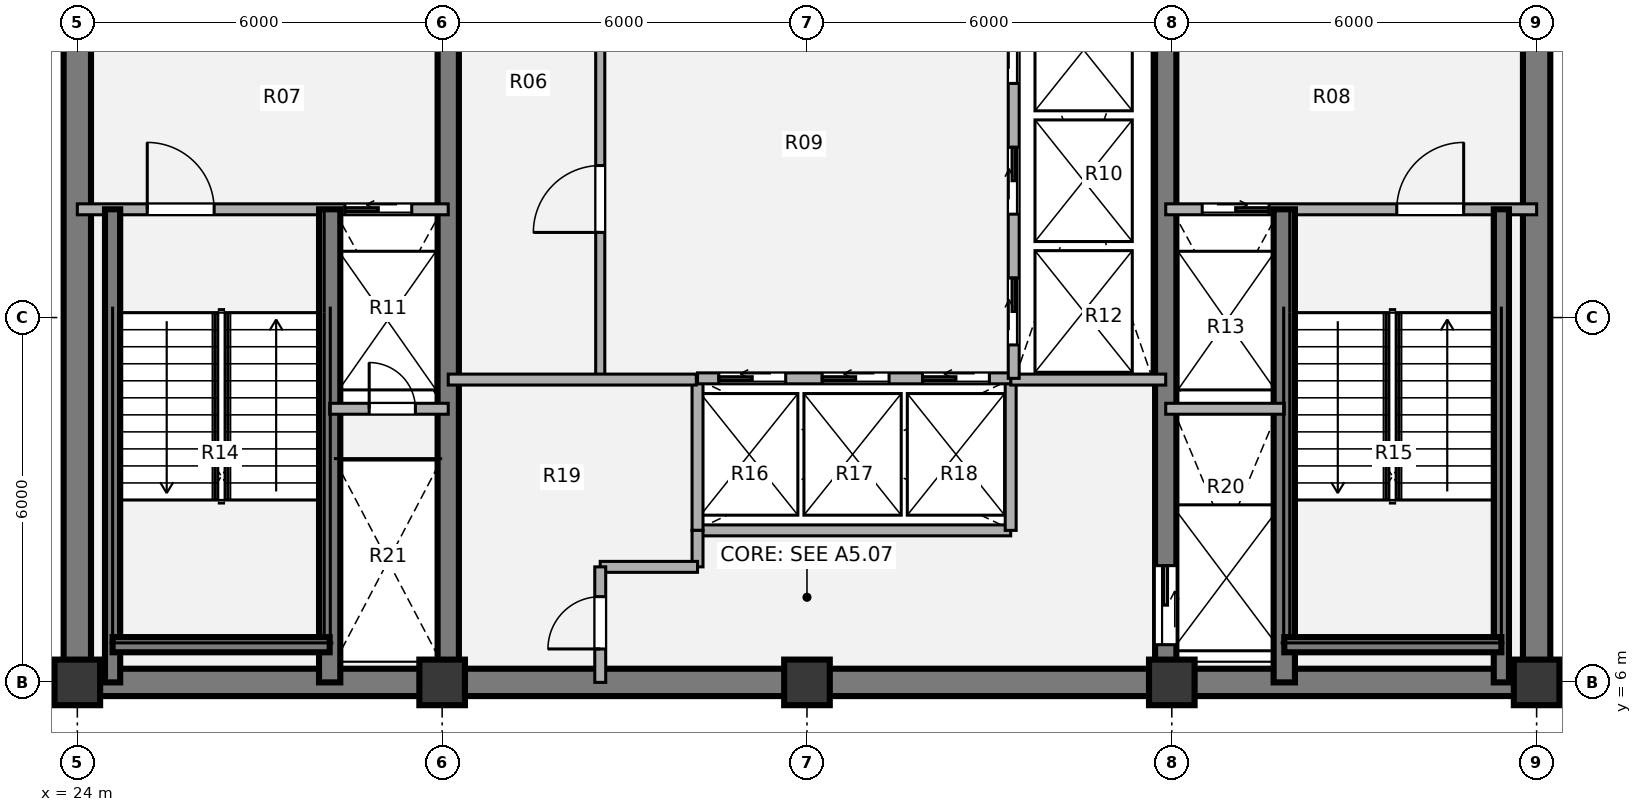
"""IFC4 building model, lengths in metres.
Left out: names, types, materials, properties, quantities, classifications, styles, units other than length and angle.
Written with IfcOpenShell. Run it as: python <this file> out.ifc"""

import sys

from ifc_helpers import new_model, si_unit, direction, frame, frame_2d, origin, origin_2d, place, context, subcontext, project, spatial, rectangle, extrude, source, transform, mapped, element, fill, save


model = new_model("IFC4")
c1 = context("Model", 3, precision=1e-05, world=origin(), true_north=direction((0.0, 1.0)))
c2 = subcontext(c1, "Body", "Model", "MODEL_VIEW")
j1 = project(units=[si_unit("LENGTHUNIT", "METRE"), si_unit("PLANEANGLEUNIT", "RADIAN")], contexts=[c1])
p1 = place(None, origin())
s1 = spatial("IfcSite", under=j1, at=p1, CompositionType="ELEMENT")
p2 = place(p1, origin())
s2 = spatial("IfcBuilding", under=s1, at=p2, CompositionType="ELEMENT")
p3 = place(p2, frame((0.0, 0.0, 151.92)))
s3 = spatial("IfcBuildingStorey", under=s2, at=p3, CompositionType="ELEMENT", Elevation=151.92)
m1 = source(origin(), c2, "Body", "SweptSolid", [
    extrude(rectangle(XDim=0.75, YDim=0.75, at=origin_2d()), origin(), (0.0, 0.0, 1.0), 4.5),
])
for number, where, z_axis, x_axis in (
    (1, (24.0, 6.0, 0.0), (0.0, 0.0, 1.0), (1.0, 0.0, 0.0)),
    (2, (30.0, 6.0, 0.0), (0.0, 0.0, 1.0), (1.0, 0.0, 0.0)),
    (3, (36.0, 6.0, 0.0), (0.0, 0.0, 1.0), (1.0, 0.0, 0.0)),
    (4, (42.0, 6.0, 0.0), (0.0, 0.0, 1.0), (1.0, 0.0, 0.0)),
    (5, (48.0, 6.0, 0.0), (0.0, 0.0, 1.0), (1.0, 0.0, 0.0)),
):
    element("IfcColumn", number, at=place(p3, frame(where, z_axis=z_axis, x_axis=x_axis)), inside=s3, PredefinedType="COLUMN", context=c2, shape_type="MappedRepresentation", body=[
        mapped(m1, transform((0.0, 0.0, 0.0), x_axis=(1.0, 0.0, 0.0), y_axis=(0.0, 1.0, 0.0), z_axis=(0.0, 0.0, 1.0), scale=1.0)),
    ])
p4 = place(p3, frame((48.225, 6.0, 0.0), z_axis=(0.0, 0.0, 1.0), x_axis=(-1.0, 0.0, 0.0)))
e6 = element("IfcWall", 6, at=p4, inside=s3, PredefinedType="SHEAR", context=c2, shape_type="SweptSolid", body=[
    extrude(rectangle(XDim=24.45, YDim=0.45, at=frame_2d((12.225, 0.0))), origin(), (0.0, 0.0, 1.0), 4.5),
])
for number, where, z_axis, x_axis in (
    (7, (24.0, 6.0, 0.0), (0.0, 0.0, 1.0), (0.0, 1.0, 0.0)),
    (8, (48.0, 18.0, 0.0), (0.0, 0.0, 1.0), (0.0, -1.0, 0.0)),
):
    element("IfcWall", number, at=place(p3, frame(where, z_axis=z_axis, x_axis=x_axis)), inside=s3, PredefinedType="SHEAR", context=c2, shape_type="SweptSolid", body=[
        extrude(rectangle(XDim=12.0, YDim=0.45, at=frame_2d((6.0, 0.0))), origin(), (0.0, 0.0, 1.0), 4.5),
    ])
p5 = place(p3, frame((30.1, 6.0, 0.0), z_axis=(0.0, 0.0, 1.0), x_axis=(0.0, 1.0, 0.0)))
e9 = element("IfcWall", 9, at=p5, inside=s3, PredefinedType="SHEAR", context=c2, shape_type="SweptSolid", body=[
    extrude(rectangle(XDim=12.0, YDim=0.35, at=frame_2d((6.0, 0.0))), origin(), (0.0, 0.0, 1.0), 4.5),
])
p6 = place(p3, frame((41.9, 18.0, 0.0), z_axis=(0.0, 0.0, 1.0), x_axis=(0.0, -1.0, 0.0)))
e10 = element("IfcWall", 10, at=p6, inside=s3, PredefinedType="SHEAR", context=c2, shape_type="SweptSolid", body=[
    extrude(rectangle(XDim=12.0, YDim=0.35, at=frame_2d((6.0, 0.0))), origin(), (0.0, 0.0, 1.0), 4.5),
])
p7 = place(p6, frame((10.08, 0.0, 0.0)))
e11 = element("IfcOpeningElement", 11, at=p7, cuts=e10, PredefinedType="OPENING", context=c2, shape_type="SweptSolid", body=[
    extrude(rectangle(XDim=1.3, YDim=2.1, at=origin_2d()), frame((0.65, 0.185, 1.05), z_axis=(0.0, -1.0, 0.0), x_axis=(1.0, 0.0, 0.0)), (0.0, 0.0, 1.0), 0.37),
])
p8 = place(p3, frame((32.6, 11.0, 0.0), z_axis=(0.0, 0.0, 1.0), x_axis=(0.0, 1.0, 0.0)))
e12 = element("IfcWall", 12, at=p8, inside=s3, PredefinedType="PARTITIONING", context=c2, shape_type="SweptSolid", body=[
    extrude(rectangle(XDim=7.0, YDim=0.15, at=frame_2d((3.5, 0.0))), origin(), (0.0, 0.0, 1.0), 4.062),
])
p9 = place(p8, frame((2.4, 0.0, 0.0)))
e13 = element("IfcOpeningElement", 13, at=p9, cuts=e12, PredefinedType="OPENING", context=c2, shape_type="SweptSolid", body=[
    extrude(rectangle(XDim=1.1, YDim=2.1, at=origin_2d()), frame((0.55, 0.085, 1.05), z_axis=(0.0, -1.0, 0.0), x_axis=(1.0, 0.0, 0.0)), (0.0, 0.0, 1.0), 0.17),
])
p10 = place(p3, frame((34.2, 8.5, 0.0), z_axis=(0.0, 0.0, 1.0), x_axis=(1.0, 0.0, 0.0)))
e14 = element("IfcWall", 14, at=p10, inside=s3, PredefinedType="PARTITIONING", context=c2, shape_type="SweptSolid", body=[
    extrude(rectangle(XDim=5.15, YDim=0.18, at=frame_2d((2.575, 0.0))), origin(), (0.0, 0.0, 1.0), 4.062),
])
for number, where, z_axis, x_axis in (
    (15, (34.2, 8.5, 0.0), (0.0, 0.0, 1.0), (0.0, 1.0, 0.0)),
    (16, (39.35, 8.5, 0.0), (0.0, 0.0, 1.0), (0.0, 1.0, 0.0)),
):
    element("IfcWall", number, at=place(p3, frame(where, z_axis=z_axis, x_axis=x_axis)), inside=s3, PredefinedType="PARTITIONING", context=c2, shape_type="SweptSolid", body=[
        extrude(rectangle(XDim=2.5, YDim=0.18, at=frame_2d((1.25, 0.0))), origin(), (0.0, 0.0, 1.0), 4.062),
    ])
p11 = place(p3, frame((30.1, 10.98, 0.0), z_axis=(0.0, 0.0, 1.0), x_axis=(1.0, 0.0, 0.0)))
e17 = element("IfcWall", 17, at=p11, inside=s3, PredefinedType="PARTITIONING", context=c2, shape_type="SweptSolid", body=[
    extrude(rectangle(XDim=4.08, YDim=0.18, at=frame_2d((2.04, 0.0))), origin(), (0.0, 0.0, 1.0), 4.062),
])
p12 = place(p3, frame((34.2, 7.9, 0.0), z_axis=(0.0, 0.0, 1.0), x_axis=(0.0, 1.0, 0.0)))
e18 = element("IfcWall", 18, at=p12, inside=s3, PredefinedType="PARTITIONING", context=c2, shape_type="SweptSolid", body=[
    extrude(rectangle(XDim=0.6, YDim=0.18, at=frame_2d((0.3, 0.0))), origin(), (0.0, 0.0, 1.0), 4.062),
])
p13 = place(p3, frame((32.6, 7.9, 0.0), z_axis=(0.0, 0.0, 1.0), x_axis=(1.0, 0.0, 0.0)))
e19 = element("IfcWall", 19, at=p13, inside=s3, PredefinedType="PARTITIONING", context=c2, shape_type="SweptSolid", body=[
    extrude(rectangle(XDim=1.6, YDim=0.18, at=frame_2d((0.8, 0.0))), origin(), (0.0, 0.0, 1.0), 4.062),
])
p14 = place(p3, frame((32.6, 6.0, 0.0), z_axis=(0.0, 0.0, 1.0), x_axis=(0.0, 1.0, 0.0)))
e20 = element("IfcWall", 20, at=p14, inside=s3, PredefinedType="PARTITIONING", context=c2, shape_type="SweptSolid", body=[
    extrude(rectangle(XDim=1.9, YDim=0.18, at=frame_2d((0.95, 0.0))), origin(), (0.0, 0.0, 1.0), 4.062),
])
p15 = place(p14, frame((0.55, 0.0, 0.0)))
e21 = element("IfcOpeningElement", 21, at=p15, cuts=e20, PredefinedType="OPENING", context=c2, shape_type="SweptSolid", body=[
    extrude(rectangle(XDim=0.86, YDim=2.1, at=origin_2d()), frame((0.43, 0.1, 1.05), z_axis=(0.0, -1.0, 0.0), x_axis=(1.0, 0.0, 0.0)), (0.0, 0.0, 1.0), 0.2),
])
p16 = place(p3, frame((39.35, 10.98, 0.0), z_axis=(0.0, 0.0, 1.0), x_axis=(1.0, 0.0, 0.0)))
e22 = element("IfcWall", 22, at=p16, inside=s3, PredefinedType="PARTITIONING", context=c2, shape_type="SweptSolid", body=[
    extrude(rectangle(XDim=2.55, YDim=0.18, at=frame_2d((1.275, 0.0))), origin(), (0.0, 0.0, 1.0), 4.062),
])
p17 = place(p3, frame((24.0, 13.78, 0.0), z_axis=(0.0, 0.0, 1.0), x_axis=(1.0, 0.0, 0.0)))
e23 = element("IfcWall", 23, at=p17, inside=s3, PredefinedType="PARTITIONING", context=c2, shape_type="SweptSolid", body=[
    extrude(rectangle(XDim=6.1, YDim=0.18, at=frame_2d((3.05, 0.0))), origin(), (0.0, 0.0, 1.0), 4.062),
])
p18 = place(p17, frame((1.15, 0.0, 0.0)))
e24 = element("IfcOpeningElement", 24, at=p18, cuts=e23, PredefinedType="OPENING", context=c2, shape_type="SweptSolid", body=[
    extrude(rectangle(XDim=1.1, YDim=2.1, at=origin_2d()), frame((0.55, 0.1, 1.05), z_axis=(0.0, -1.0, 0.0), x_axis=(1.0, 0.0, 0.0)), (0.0, 0.0, 1.0), 0.2),
])
p19 = place(p17, frame((4.4, 0.0, 0.0)))
e25 = element("IfcOpeningElement", 25, at=p19, cuts=e23, PredefinedType="OPENING", context=c2, shape_type="SweptSolid", body=[
    extrude(rectangle(XDim=1.1, YDim=2.1, at=origin_2d()), frame((0.55, 0.1, 1.05), z_axis=(0.0, -1.0, 0.0), x_axis=(1.0, 0.0, 0.0)), (0.0, 0.0, 1.0), 0.2),
])
p20 = place(p3, frame((28.15, 6.0, 0.0), z_axis=(0.0, 0.0, 1.0), x_axis=(0.0, 1.0, 0.0)))
e26 = element("IfcWall", 26, at=p20, inside=s3, PredefinedType="SHEAR", context=c2, shape_type="SweptSolid", body=[
    extrude(rectangle(XDim=7.78, YDim=0.35, at=frame_2d((3.89, 0.0))), origin(), (0.0, 0.0, 1.0), 4.412),
])
p21 = place(p3, frame((24.58, 6.0, 0.0), z_axis=(0.0, 0.0, 1.0), x_axis=(0.0, 1.0, 0.0)))
e27 = element("IfcWall", 27, at=p21, inside=s3, PredefinedType="SHEAR", context=c2, shape_type="SweptSolid", body=[
    extrude(rectangle(XDim=7.78, YDim=0.25, at=frame_2d((3.89, 0.0))), origin(), (0.0, 0.0, 1.0), 4.412),
])
p22 = place(p3, frame((24.58, 6.62, 0.0), z_axis=(0.0, 0.0, 1.0), x_axis=(1.0, 0.0, 0.0)))
e28 = element("IfcWall", 28, at=p22, inside=s3, PredefinedType="SHEAR", context=c2, shape_type="SweptSolid", body=[
    extrude(rectangle(XDim=3.57, YDim=0.25, at=frame_2d((1.785, 0.0))), origin(), (0.0, 0.0, 1.0), 4.412),
])
p23 = place(p3, frame((28.15, 10.5, 0.0), z_axis=(0.0, 0.0, 1.0), x_axis=(1.0, 0.0, 0.0)))
e29 = element("IfcWall", 29, at=p23, inside=s3, PredefinedType="PARTITIONING", context=c2, shape_type="SweptSolid", body=[
    extrude(rectangle(XDim=1.95, YDim=0.18, at=frame_2d((0.975, 0.0))), origin(), (0.0, 0.0, 1.0), 4.062),
])
p24 = place(p23, frame((0.65, 0.0, 0.0)))
e30 = element("IfcOpeningElement", 30, at=p24, cuts=e29, PredefinedType="OPENING", context=c2, shape_type="SweptSolid", body=[
    extrude(rectangle(XDim=0.76, YDim=2.05, at=origin_2d()), frame((0.38, 0.1, 1.025), z_axis=(0.0, -1.0, 0.0), x_axis=(1.0, 0.0, 0.0)), (0.0, 0.0, 1.0), 0.2),
])
p25 = place(p3, frame((41.9, 13.78, 0.0), z_axis=(0.0, 0.0, 1.0), x_axis=(1.0, 0.0, 0.0)))
e31 = element("IfcWall", 31, at=p25, inside=s3, PredefinedType="PARTITIONING", context=c2, shape_type="SweptSolid", body=[
    extrude(rectangle(XDim=6.1, YDim=0.18, at=frame_2d((3.05, 0.0))), origin(), (0.0, 0.0, 1.0), 4.062),
])
p26 = place(p25, frame((0.6, 0.0, 0.0)))
e32 = element("IfcOpeningElement", 32, at=p26, cuts=e31, PredefinedType="OPENING", context=c2, shape_type="SweptSolid", body=[
    extrude(rectangle(XDim=1.1, YDim=2.1, at=origin_2d()), frame((0.55, 0.1, 1.05), z_axis=(0.0, -1.0, 0.0), x_axis=(1.0, 0.0, 0.0)), (0.0, 0.0, 1.0), 0.2),
])
p27 = place(p25, frame((3.8, 0.0, 0.0)))
e33 = element("IfcOpeningElement", 33, at=p27, cuts=e31, PredefinedType="OPENING", context=c2, shape_type="SweptSolid", body=[
    extrude(rectangle(XDim=1.1, YDim=2.1, at=origin_2d()), frame((0.55, 0.1, 1.05), z_axis=(0.0, -1.0, 0.0), x_axis=(1.0, 0.0, 0.0)), (0.0, 0.0, 1.0), 0.2),
])
p28 = place(p3, frame((43.85, 6.0, 0.0), z_axis=(0.0, 0.0, 1.0), x_axis=(0.0, 1.0, 0.0)))
e34 = element("IfcWall", 34, at=p28, inside=s3, PredefinedType="SHEAR", context=c2, shape_type="SweptSolid", body=[
    extrude(rectangle(XDim=7.78, YDim=0.35, at=frame_2d((3.89, 0.0))), origin(), (0.0, 0.0, 1.0), 4.412),
])
p29 = place(p3, frame((47.42, 6.0, 0.0), z_axis=(0.0, 0.0, 1.0), x_axis=(0.0, 1.0, 0.0)))
e35 = element("IfcWall", 35, at=p29, inside=s3, PredefinedType="SHEAR", context=c2, shape_type="SweptSolid", body=[
    extrude(rectangle(XDim=7.78, YDim=0.25, at=frame_2d((3.89, 0.0))), origin(), (0.0, 0.0, 1.0), 4.412),
])
p30 = place(p3, frame((43.85, 6.62, 0.0), z_axis=(0.0, 0.0, 1.0), x_axis=(1.0, 0.0, 0.0)))
e36 = element("IfcWall", 36, at=p30, inside=s3, PredefinedType="SHEAR", context=c2, shape_type="SweptSolid", body=[
    extrude(rectangle(XDim=3.57, YDim=0.25, at=frame_2d((1.785, 0.0))), origin(), (0.0, 0.0, 1.0), 4.412),
])
p31 = place(p3, frame((41.9, 10.5, 0.0), z_axis=(0.0, 0.0, 1.0), x_axis=(1.0, 0.0, 0.0)))
e37 = element("IfcWall", 37, at=p31, inside=s3, PredefinedType="PARTITIONING", context=c2, shape_type="SweptSolid", body=[
    extrude(rectangle(XDim=1.95, YDim=0.18, at=frame_2d((0.975, 0.0))), origin(), (0.0, 0.0, 1.0), 4.062),
])
p32 = place(p3, frame((34.2, 11.0, 0.0), z_axis=(0.0, 0.0, 1.0), x_axis=(1.0, 0.0, 0.0)))
e38 = element("IfcWall", 38, at=p32, inside=s3, PredefinedType="PARTITIONING", context=c2, shape_type="SweptSolid", body=[
    extrude(rectangle(XDim=5.15, YDim=0.18, at=frame_2d((2.575, 0.0))), origin(), (0.0, 0.0, 1.0), 4.062),
])
p33 = place(p32, frame((0.35, 0.0, 0.0)))
e39 = element("IfcOpeningElement", 39, at=p33, cuts=e38, PredefinedType="OPENING", context=c2, shape_type="SweptSolid", body=[
    extrude(rectangle(XDim=1.1, YDim=2.1, at=origin_2d()), frame((0.55, 0.1, 1.05), z_axis=(0.0, -1.0, 0.0), x_axis=(1.0, 0.0, 0.0)), (0.0, 0.0, 1.0), 0.2),
])
p34 = place(p32, frame((2.05, 0.0, 0.0)))
e40 = element("IfcOpeningElement", 40, at=p34, cuts=e38, PredefinedType="OPENING", context=c2, shape_type="SweptSolid", body=[
    extrude(rectangle(XDim=1.1, YDim=2.1, at=origin_2d()), frame((0.55, 0.1, 1.05), z_axis=(0.0, -1.0, 0.0), x_axis=(1.0, 0.0, 0.0)), (0.0, 0.0, 1.0), 0.2),
])
p35 = place(p32, frame((3.7, 0.0, 0.0)))
e41 = element("IfcOpeningElement", 41, at=p35, cuts=e38, PredefinedType="OPENING", context=c2, shape_type="SweptSolid", body=[
    extrude(rectangle(XDim=1.1, YDim=2.1, at=origin_2d()), frame((0.55, 0.1, 1.05), z_axis=(0.0, -1.0, 0.0), x_axis=(1.0, 0.0, 0.0)), (0.0, 0.0, 1.0), 0.2),
])
p36 = place(p3, frame((39.4, 11.0, 0.0), z_axis=(0.0, 0.0, 1.0), x_axis=(0.0, 1.0, 0.0)))
e42 = element("IfcWall", 42, at=p36, inside=s3, PredefinedType="PARTITIONING", context=c2, shape_type="SweptSolid", body=[
    extrude(rectangle(XDim=7.0, YDim=0.18, at=frame_2d((3.5, 0.0))), origin(), (0.0, 0.0, 1.0), 4.062),
])
p37 = place(p36, frame((0.55, 0.0, 0.0)))
e43 = element("IfcOpeningElement", 43, at=p37, cuts=e42, PredefinedType="OPENING", context=c2, shape_type="SweptSolid", body=[
    extrude(rectangle(XDim=1.1, YDim=2.1, at=origin_2d()), frame((0.55, 0.1, 1.05), z_axis=(0.0, -1.0, 0.0), x_axis=(1.0, 0.0, 0.0)), (0.0, 0.0, 1.0), 0.2),
])
p38 = place(p36, frame((2.7, 0.0, 0.0)))
e44 = element("IfcOpeningElement", 44, at=p38, cuts=e42, PredefinedType="OPENING", context=c2, shape_type="SweptSolid", body=[
    extrude(rectangle(XDim=1.1, YDim=2.1, at=origin_2d()), frame((0.55, 0.1, 1.05), z_axis=(0.0, -1.0, 0.0), x_axis=(1.0, 0.0, 0.0)), (0.0, 0.0, 1.0), 0.2),
])
p39 = place(p36, frame((4.85, 0.0, 0.0)))
e45 = element("IfcOpeningElement", 45, at=p39, cuts=e42, PredefinedType="OPENING", context=c2, shape_type="SweptSolid", body=[
    extrude(rectangle(XDim=1.1, YDim=2.1, at=origin_2d()), frame((0.55, 0.1, 1.05), z_axis=(0.0, -1.0, 0.0), x_axis=(1.0, 0.0, 0.0)), (0.0, 0.0, 1.0), 0.2),
])
m2 = source(origin(), c2, "Body", "SweptSolid", [
    extrude(rectangle(XDim=1.1, YDim=2.1, at=origin_2d()), frame((0.55, 0.025, 1.05), z_axis=(0.0, -1.0, 0.0), x_axis=(1.0, 0.0, 0.0)), (0.0, 0.0, 1.0), 0.05),
])
p40 = place(p9, origin())
e46 = element("IfcDoor", 46, at=p40, inside=s3, OperationType="SINGLE_SWING_LEFT", PredefinedType="DOOR", context=c2, shape_type="MappedRepresentation", body=[
    mapped(m2, transform((0.0, 0.0, 0.0), x_axis=(1.0, 0.0, 0.0), y_axis=(0.0, 1.0, 0.0), z_axis=(0.0, 0.0, 1.0), scale=1.0)),
])
fill(e13, e46)
m3 = source(origin(), c2, "Body", "SweptSolid", [
    extrude(rectangle(XDim=0.86, YDim=2.1, at=origin_2d()), frame((0.43, 0.025, 1.05), z_axis=(0.0, -1.0, 0.0), x_axis=(1.0, 0.0, 0.0)), (0.0, 0.0, 1.0), 0.05),
])
p41 = place(p15, origin())
e47 = element("IfcDoor", 47, at=p41, inside=s3, OperationType="SINGLE_SWING_LEFT", PredefinedType="DOOR", context=c2, shape_type="MappedRepresentation", body=[
    mapped(m3, transform((0.0, 0.0, 0.0), x_axis=(1.0, 0.0, 0.0), y_axis=(0.0, 1.0, 0.0), z_axis=(0.0, 0.0, 1.0), scale=1.0)),
])
fill(e21, e47)
m4 = source(origin(), c2, "Body", "SweptSolid", [
    extrude(rectangle(XDim=1.1, YDim=2.1, at=origin_2d()), frame((0.55, 0.025, 1.05), z_axis=(0.0, -1.0, 0.0), x_axis=(1.0, 0.0, 0.0)), (0.0, 0.0, 1.0), 0.05),
])
p42 = place(p18, origin())
e48 = element("IfcDoor", 48, at=p42, inside=s3, OperationType="SINGLE_SWING_LEFT", PredefinedType="DOOR", context=c2, shape_type="MappedRepresentation", body=[
    mapped(m4, transform((0.0, 0.0, 0.0), x_axis=(1.0, 0.0, 0.0), y_axis=(0.0, 1.0, 0.0), z_axis=(0.0, 0.0, 1.0), scale=1.0)),
])
fill(e24, e48)
m5 = source(origin(), c2, "Body", "SweptSolid", [
    extrude(rectangle(XDim=1.1, YDim=2.1, at=origin_2d()), frame((0.55, 0.025, 1.05), z_axis=(0.0, -1.0, 0.0), x_axis=(1.0, 0.0, 0.0)), (0.0, 0.0, 1.0), 0.05),
])
p43 = place(p19, origin())
e49 = element("IfcDoor", 49, at=p43, inside=s3, OperationType="SLIDING_TO_LEFT", PredefinedType="DOOR", context=c2, shape_type="MappedRepresentation", body=[
    mapped(m5, transform((0.0, 0.0, 0.0), x_axis=(1.0, 0.0, 0.0), y_axis=(0.0, 1.0, 0.0), z_axis=(0.0, 0.0, 1.0), scale=1.0)),
])
fill(e25, e49)
m6 = source(origin(), c2, "Body", "SweptSolid", [
    extrude(rectangle(XDim=0.76, YDim=2.05, at=origin_2d()), frame((0.38, 0.025, 1.025), z_axis=(0.0, -1.0, 0.0), x_axis=(1.0, 0.0, 0.0)), (0.0, 0.0, 1.0), 0.05),
])
p44 = place(p24, origin())
e50 = element("IfcDoor", 50, at=p44, inside=s3, OperationType="SINGLE_SWING_LEFT", PredefinedType="DOOR", context=c2, shape_type="MappedRepresentation", body=[
    mapped(m6, transform((0.0, 0.0, 0.0), x_axis=(1.0, 0.0, 0.0), y_axis=(0.0, 1.0, 0.0), z_axis=(0.0, 0.0, 1.0), scale=1.0)),
])
fill(e30, e50)
p45 = place(p26, origin())
e51 = element("IfcDoor", 51, at=p45, inside=s3, OperationType="SLIDING_TO_RIGHT", PredefinedType="DOOR", context=c2, shape_type="MappedRepresentation", body=[
    mapped(m5, transform((0.0, 0.0, 0.0), x_axis=(1.0, 0.0, 0.0), y_axis=(0.0, 1.0, 0.0), z_axis=(0.0, 0.0, 1.0), scale=1.0)),
])
fill(e32, e51)
p46 = place(p27, origin())
e52 = element("IfcDoor", 52, at=p46, inside=s3, OperationType="SINGLE_SWING_RIGHT", PredefinedType="DOOR", context=c2, shape_type="MappedRepresentation", body=[
    mapped(m4, transform((0.0, 0.0, 0.0), x_axis=(1.0, 0.0, 0.0), y_axis=(0.0, 1.0, 0.0), z_axis=(0.0, 0.0, 1.0), scale=1.0)),
])
fill(e33, e52)
m7 = source(origin(), c2, "Body", "SweptSolid", [
    extrude(rectangle(XDim=1.3, YDim=2.1, at=origin_2d()), frame((0.65, 0.025, 1.05), z_axis=(0.0, -1.0, 0.0), x_axis=(1.0, 0.0, 0.0)), (0.0, 0.0, 1.0), 0.05),
])
p47 = place(p7, origin())
e53 = element("IfcDoor", 53, at=p47, inside=s3, OperationType="SLIDING_TO_LEFT", PredefinedType="DOOR", context=c2, shape_type="MappedRepresentation", body=[
    mapped(m7, transform((0.0, 0.0, 0.0), x_axis=(1.0, 0.0, 0.0), y_axis=(0.0, 1.0, 0.0), z_axis=(0.0, 0.0, 1.0), scale=1.0)),
])
fill(e11, e53)
p48 = place(p33, origin())
e54 = element("IfcDoor", 54, at=p48, inside=s3, OperationType="SLIDING_TO_LEFT", PredefinedType="DOOR", context=c2, shape_type="MappedRepresentation", body=[
    mapped(m5, transform((0.0, 0.0, 0.0), x_axis=(1.0, 0.0, 0.0), y_axis=(0.0, 1.0, 0.0), z_axis=(0.0, 0.0, 1.0), scale=1.0)),
])
fill(e39, e54)
p49 = place(p34, origin())
e55 = element("IfcDoor", 55, at=p49, inside=s3, OperationType="SLIDING_TO_LEFT", PredefinedType="DOOR", context=c2, shape_type="MappedRepresentation", body=[
    mapped(m5, transform((0.0, 0.0, 0.0), x_axis=(1.0, 0.0, 0.0), y_axis=(0.0, 1.0, 0.0), z_axis=(0.0, 0.0, 1.0), scale=1.0)),
])
fill(e40, e55)
p50 = place(p35, origin())
e56 = element("IfcDoor", 56, at=p50, inside=s3, OperationType="SLIDING_TO_LEFT", PredefinedType="DOOR", context=c2, shape_type="MappedRepresentation", body=[
    mapped(m5, transform((0.0, 0.0, 0.0), x_axis=(1.0, 0.0, 0.0), y_axis=(0.0, 1.0, 0.0), z_axis=(0.0, 0.0, 1.0), scale=1.0)),
])
fill(e41, e56)
p51 = place(p37, origin())
e57 = element("IfcDoor", 57, at=p51, inside=s3, OperationType="SLIDING_TO_RIGHT", PredefinedType="DOOR", context=c2, shape_type="MappedRepresentation", body=[
    mapped(m5, transform((0.0, 0.0, 0.0), x_axis=(1.0, 0.0, 0.0), y_axis=(0.0, 1.0, 0.0), z_axis=(0.0, 0.0, 1.0), scale=1.0)),
])
fill(e43, e57)
p52 = place(p38, origin())
e58 = element("IfcDoor", 58, at=p52, inside=s3, OperationType="SLIDING_TO_RIGHT", PredefinedType="DOOR", context=c2, shape_type="MappedRepresentation", body=[
    mapped(m5, transform((0.0, 0.0, 0.0), x_axis=(1.0, 0.0, 0.0), y_axis=(0.0, 1.0, 0.0), z_axis=(0.0, 0.0, 1.0), scale=1.0)),
])
fill(e44, e58)
p53 = place(p39, origin())
e59 = element("IfcDoor", 59, at=p53, inside=s3, OperationType="SLIDING_TO_RIGHT", PredefinedType="DOOR", context=c2, shape_type="MappedRepresentation", body=[
    mapped(m5, transform((0.0, 0.0, 0.0), x_axis=(1.0, 0.0, 0.0), y_axis=(0.0, 1.0, 0.0), z_axis=(0.0, 0.0, 1.0), scale=1.0)),
])
fill(e45, e59)
save(model, sys.argv[1])
